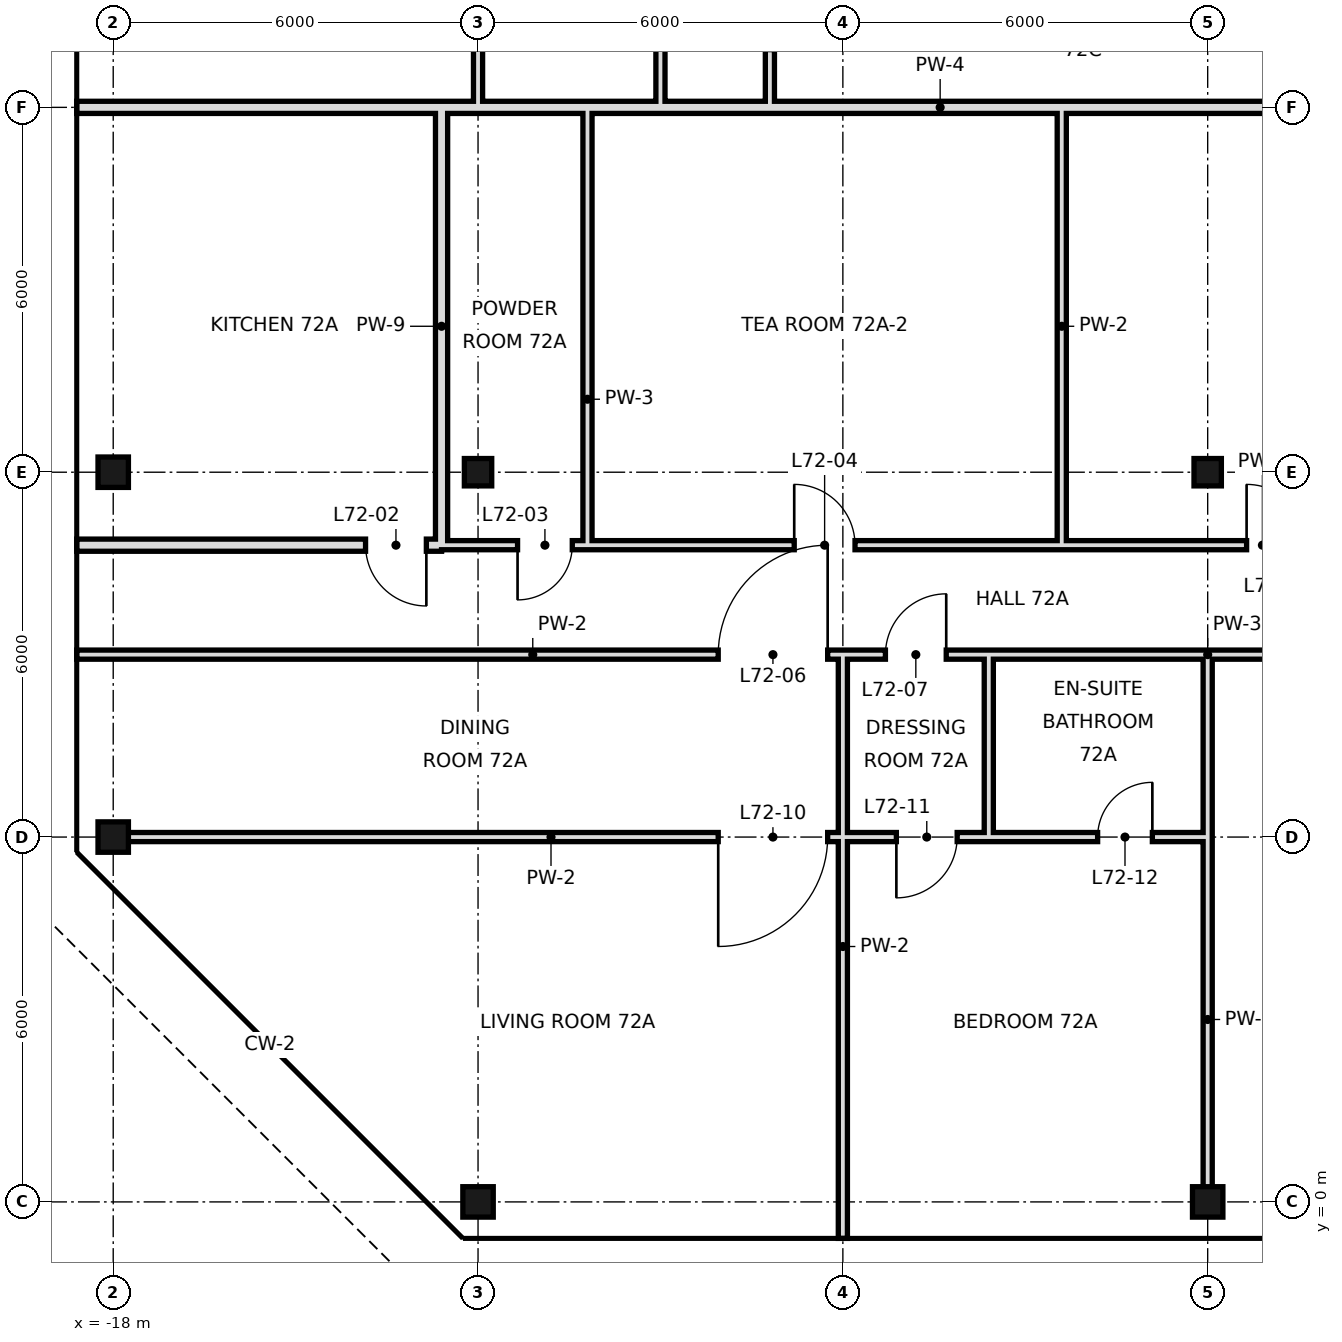
"""IFC4 building model, lengths in metres.
Left out: names, types, materials, properties, quantities, classifications, styles, units other than length and angle.
Written with IfcOpenShell. Run it as: python <this file> out.ifc"""

import sys

from ifc_helpers import new_model, si_unit, direction, frame, frame_2d, origin, origin_with_axes, origin_2d, place, context, subcontext, project, spatial, rectangle, hollow_rectangle, extrude, element, fill, save


model = new_model("IFC4")
c1 = context("Model", 3, precision=1e-05, world=origin(), true_north=direction((0.0, 1.0)))
c2 = subcontext(c1, "Body", "Model", "MODEL_VIEW")
j1 = project(units=[si_unit("LENGTHUNIT", "METRE"), si_unit("PLANEANGLEUNIT", "RADIAN")], contexts=[c1])
p1 = place(None, origin())
s1 = spatial("IfcSite", under=j1, at=p1, CompositionType="ELEMENT")
p2 = place(p1, origin())
s2 = spatial("IfcBuilding", under=s1, at=p2, CompositionType="ELEMENT")
p3 = place(p2, frame((0.0, 0.0, 305.2)))
s3 = spatial("IfcBuildingStorey", under=s2, at=p3, CompositionType="ELEMENT", Elevation=305.2)
for number, where, z_axis, x_axis in (
    (1, (-18.0, 6.0, 0.0), (0.0, 0.0, 1.0), (1.0, 0.0, 0.0)),
    (2, (-18.0, 12.0, 0.0), (0.0, 0.0, 1.0), (1.0, 0.0, 0.0)),
    (3, (-12.0, 0.0, 0.0), (0.0, 0.0, 1.0), (1.0, 0.0, 0.0)),
):
    element("IfcColumn", number, at=place(p3, frame(where, z_axis=z_axis, x_axis=x_axis)), inside=s3, PredefinedType="COLUMN", context=c2, shape_type="SweptSolid", body=[
        extrude(hollow_rectangle(XDim=0.5, YDim=0.5, WallThickness=0.025, at=origin_2d()), origin(), (0.0, 0.0, 1.0), 3.6),
    ])
p4 = place(p3, frame((-12.0, 12.0, 0.0), z_axis=(0.0, 0.0, 1.0), x_axis=(1.0, 0.0, 0.0)))
e4 = element("IfcColumn", 4, at=p4, inside=s3, PredefinedType="COLUMN", context=c2, shape_type="SweptSolid", body=[
    extrude(hollow_rectangle(XDim=0.45, YDim=0.45, WallThickness=0.022, at=origin_2d()), origin(), (0.0, 0.0, 1.0), 3.6),
])
p5 = place(p3, origin_with_axes())
e5 = element("IfcColumn", 5, at=p5, inside=s3, PredefinedType="COLUMN", context=c2, shape_type="SweptSolid", body=[
    extrude(hollow_rectangle(XDim=0.5, YDim=0.5, WallThickness=0.025, at=origin_2d()), origin(), (0.0, 0.0, 1.0), 3.6),
])
p6 = place(p3, frame((0.0, 12.0, 0.0), z_axis=(0.0, 0.0, 1.0), x_axis=(1.0, 0.0, 0.0)))
e6 = element("IfcColumn", 6, at=p6, inside=s3, PredefinedType="COLUMN", context=c2, shape_type="SweptSolid", body=[
    extrude(hollow_rectangle(XDim=0.45, YDim=0.45, WallThickness=0.022, at=origin_2d()), origin(), (0.0, 0.0, 1.0), 3.6),
])
p7 = place(p3, frame((-10.2, 10.8, 0.0), z_axis=(0.0, 0.0, 1.0), x_axis=(0.0, 1.0, 0.0)))
e7 = element("IfcWall", 7, at=p7, inside=s3, PredefinedType="PARTITIONING", context=c2, shape_type="SweptSolid", body=[
    extrude(rectangle(XDim=7.2, YDim=0.15, at=frame_2d((3.6, 0.0))), origin(), (0.0, 0.0, 1.0), 3.42),
])
p8 = place(p3, frame((-12.0, 18.0, 0.0), z_axis=(0.0, 0.0, 1.0), x_axis=(0.0, 1.0, 0.0)))
e8 = element("IfcWall", 8, at=p8, inside=s3, PredefinedType="PARTITIONING", context=c2, shape_type="SweptSolid", body=[
    extrude(rectangle(XDim=12.0, YDim=0.15, at=frame_2d((6.0, 0.0))), origin(), (0.0, 0.0, 1.0), 2.72),
])
p9 = place(p8, frame((3.16, 0.0, 0.0)))
e9 = element("IfcOpeningElement", 9, at=p9, cuts=e8, PredefinedType="OPENING", context=c2, shape_type="SweptSolid", body=[
    extrude(rectangle(XDim=1.8, YDim=2.4, at=frame_2d((0.9, 1.2))), frame((0.0, 0.085, 0.0), z_axis=(0.0, -1.0, 0.0), x_axis=(1.0, 0.0, 0.0)), (0.0, 0.0, 1.0), 0.17),
])
p10 = place(p3, frame((-12.6, 10.8, 0.0), z_axis=(0.0, 0.0, 1.0), x_axis=(0.0, 1.0, 0.0)))
e10 = element("IfcWall", 10, at=p10, inside=s3, PredefinedType="SOLIDWALL", context=c2, shape_type="SweptSolid", body=[
    extrude(rectangle(XDim=7.2, YDim=0.2, at=frame_2d((3.6, 0.0))), origin(), (0.0, 0.0, 1.0), 2.97),
])
p11 = place(p3, frame((-2.4, 10.8, 0.0), z_axis=(0.0, 0.0, 1.0), x_axis=(0.0, 1.0, 0.0)))
e11 = element("IfcWall", 11, at=p11, inside=s3, PredefinedType="PARTITIONING", context=c2, shape_type="SweptSolid", body=[
    extrude(rectangle(XDim=7.2, YDim=0.15, at=frame_2d((3.6, 0.0))), origin(), (0.0, 0.0, 1.0), 3.42),
])
p12 = place(p3, frame((-3.6, 6.0, 0.0), z_axis=(0.0, 0.0, 1.0), x_axis=(0.0, 1.0, 0.0)))
e12 = element("IfcWall", 12, at=p12, inside=s3, PredefinedType="PARTITIONING", context=c2, shape_type="SweptSolid", body=[
    extrude(rectangle(XDim=3.0, YDim=0.15, at=frame_2d((1.5, 0.0))), origin(), (0.0, 0.0, 1.0), 3.42),
])
p13 = place(p3, frame((-6.0, -0.6, 0.0), z_axis=(0.0, 0.0, 1.0), x_axis=(0.0, 1.0, 0.0)))
e13 = element("IfcWall", 13, at=p13, inside=s3, PredefinedType="PARTITIONING", context=c2, shape_type="SweptSolid", body=[
    extrude(rectangle(XDim=9.6, YDim=0.15, at=frame_2d((4.8, 0.0))), origin(), (0.0, 0.0, 1.0), 3.42),
])
p14 = place(p3, frame((-7.2, 18.0, 0.0), z_axis=(0.0, 0.0, 1.0), x_axis=(0.0, 1.0, 0.0)))
e14 = element("IfcWall", 14, at=p14, inside=s3, PredefinedType="PARTITIONING", context=c2, shape_type="SweptSolid", body=[
    extrude(rectangle(XDim=2.4, YDim=0.15, at=frame_2d((1.2, 0.0))), origin(), (0.0, 0.0, 1.0), 3.42),
])
p15 = place(p14, frame((0.95, 0.0, 0.0)))
e15 = element("IfcOpeningElement", 15, at=p15, cuts=e14, PredefinedType="OPENING", context=c2, shape_type="SweptSolid", body=[
    extrude(rectangle(XDim=0.9, YDim=2.4, at=frame_2d((0.45, 1.2))), frame((0.0, 0.085, 0.0), z_axis=(0.0, -1.0, 0.0), x_axis=(1.0, 0.0, 0.0)), (0.0, 0.0, 1.0), 0.17),
])
p16 = place(p3, frame((-9.0, 18.0, 0.0), z_axis=(0.0, 0.0, 1.0), x_axis=(0.0, 1.0, 0.0)))
e16 = element("IfcWall", 16, at=p16, inside=s3, PredefinedType="PARTITIONING", context=c2, shape_type="SweptSolid", body=[
    extrude(rectangle(XDim=18.0, YDim=0.15, at=frame_2d((9.0, 0.0))), origin(), (0.0, 0.0, 1.0), 3.42),
])
p17 = place(p16, frame((3.16, 0.0, 0.0)))
e17 = element("IfcOpeningElement", 17, at=p17, cuts=e16, PredefinedType="OPENING", context=c2, shape_type="SweptSolid", body=[
    extrude(rectangle(XDim=1.8, YDim=2.4, at=frame_2d((0.9, 1.2))), frame((0.0, 0.085, 0.0), z_axis=(0.0, -1.0, 0.0), x_axis=(1.0, 0.0, 0.0)), (0.0, 0.0, 1.0), 0.17),
])
p18 = place(p16, frame((13.6, 0.0, 0.0)))
e18 = element("IfcOpeningElement", 18, at=p18, cuts=e16, PredefinedType="OPENING", context=c2, shape_type="SweptSolid", body=[
    extrude(rectangle(XDim=1.0, YDim=2.4, at=frame_2d((0.5, 1.2))), frame((0.0, 0.085, 0.0), z_axis=(0.0, -1.0, 0.0), x_axis=(1.0, 0.0, 0.0)), (0.0, 0.0, 1.0), 0.17),
])
p19 = place(p3, frame((0.0, 0.0, 0.0), z_axis=(0.0, 0.0, 1.0), x_axis=(0.0, 1.0, 0.0)))
e19 = element("IfcWall", 19, at=p19, inside=s3, PredefinedType="PARTITIONING", context=c2, shape_type="SweptSolid", body=[
    extrude(rectangle(XDim=6.0, YDim=0.15, at=frame_2d((3.0, 0.0))), origin(), (0.0, 0.0, 1.0), 2.72),
])
p20 = place(p3, frame((0.0, 6.0, 0.0), z_axis=(0.0, 0.0, 1.0), x_axis=(0.0, 1.0, 0.0)))
e20 = element("IfcWall", 20, at=p20, inside=s3, PredefinedType="PARTITIONING", context=c2, shape_type="SweptSolid", body=[
    extrude(rectangle(XDim=3.0, YDim=0.15, at=frame_2d((1.5, 0.0))), origin(), (0.0, 0.0, 1.0), 2.72),
])
p21 = place(p3, frame((-18.6, 10.8, 0.0), z_axis=(0.0, 0.0, 1.0), x_axis=(1.0, 0.0, 0.0)))
e21 = element("IfcWall", 21, at=p21, inside=s3, PredefinedType="SOLIDWALL", context=c2, shape_type="SweptSolid", body=[
    extrude(rectangle(XDim=6.0, YDim=0.2, at=frame_2d((3.0, 0.0))), origin(), (0.0, 0.0, 1.0), 2.97),
])
p22 = place(p21, frame((4.75, 0.0, 0.0)))
e22 = element("IfcOpeningElement", 22, at=p22, cuts=e21, PredefinedType="OPENING", context=c2, shape_type="SweptSolid", body=[
    extrude(rectangle(XDim=1.0, YDim=2.4, at=frame_2d((0.5, 1.2))), frame((0.0, 0.11, 0.0), z_axis=(0.0, -1.0, 0.0), x_axis=(1.0, 0.0, 0.0)), (0.0, 0.0, 1.0), 0.22),
])
p23 = place(p3, frame((-10.2, 10.8, 0.0), z_axis=(0.0, 0.0, 1.0), x_axis=(1.0, 0.0, 0.0)))
e23 = element("IfcWall", 23, at=p23, inside=s3, PredefinedType="PARTITIONING", context=c2, shape_type="SweptSolid", body=[
    extrude(rectangle(XDim=22.2, YDim=0.15, at=frame_2d((11.1, 0.0))), origin(), (0.0, 0.0, 1.0), 3.42),
])
p24 = place(p23, frame((20.32, 0.0, 0.0)))
e24 = element("IfcOpeningElement", 24, at=p24, cuts=e23, PredefinedType="OPENING", context=c2, shape_type="SweptSolid", body=[
    extrude(rectangle(XDim=1.0, YDim=2.4, at=frame_2d((0.5, 1.2))), frame((0.0, 0.085, 0.0), z_axis=(0.0, -1.0, 0.0), x_axis=(1.0, 0.0, 0.0)), (0.0, 0.0, 1.0), 0.17),
])
p25 = place(p23, frame((3.4, 0.0, 0.0)))
e25 = element("IfcOpeningElement", 25, at=p25, cuts=e23, PredefinedType="OPENING", context=c2, shape_type="SweptSolid", body=[
    extrude(rectangle(XDim=1.0, YDim=2.4, at=frame_2d((0.5, 1.2))), frame((0.0, 0.085, 0.0), z_axis=(0.0, -1.0, 0.0), x_axis=(1.0, 0.0, 0.0)), (0.0, 0.0, 1.0), 0.17),
])
p26 = place(p23, frame((10.84, 0.0, 0.0)))
e26 = element("IfcOpeningElement", 26, at=p26, cuts=e23, PredefinedType="OPENING", context=c2, shape_type="SweptSolid", body=[
    extrude(rectangle(XDim=1.0, YDim=2.4, at=frame_2d((0.5, 1.2))), frame((0.0, 0.085, 0.0), z_axis=(0.0, -1.0, 0.0), x_axis=(1.0, 0.0, 0.0)), (0.0, 0.0, 1.0), 0.17),
])
p27 = place(p3, frame((-12.6, 10.8, 0.0), z_axis=(0.0, 0.0, 1.0), x_axis=(1.0, 0.0, 0.0)))
e27 = element("IfcWall", 27, at=p27, inside=s3, PredefinedType="PARTITIONING", context=c2, shape_type="SweptSolid", body=[
    extrude(rectangle(XDim=2.4, YDim=0.15, at=frame_2d((1.2, 0.0))), origin(), (0.0, 0.0, 1.0), 3.42),
])
p28 = place(p27, frame((1.25, 0.0, 0.0)))
e28 = element("IfcOpeningElement", 28, at=p28, cuts=e27, PredefinedType="OPENING", context=c2, shape_type="SweptSolid", body=[
    extrude(rectangle(XDim=0.9, YDim=2.4, at=frame_2d((0.45, 1.2))), frame((0.0, 0.085, 0.0), z_axis=(0.0, -1.0, 0.0), x_axis=(1.0, 0.0, 0.0)), (0.0, 0.0, 1.0), 0.17),
])
p29 = place(p3, frame((-18.6, 18.0, 0.0), z_axis=(0.0, 0.0, 1.0), x_axis=(1.0, 0.0, 0.0)))
e29 = element("IfcWall", 29, at=p29, inside=s3, PredefinedType="SOLIDWALL", context=c2, shape_type="SweptSolid", body=[
    extrude(rectangle(XDim=6.0, YDim=0.2, at=frame_2d((3.0, 0.0))), origin(), (0.0, 0.0, 1.0), 2.72),
])
p30 = place(p3, frame((-12.6, 18.0, 0.0), z_axis=(0.0, 0.0, 1.0), x_axis=(1.0, 0.0, 0.0)))
e30 = element("IfcWall", 30, at=p30, inside=s3, PredefinedType="SOLIDWALL", context=c2, shape_type="SweptSolid", body=[
    extrude(rectangle(XDim=15.7, YDim=0.2, at=frame_2d((7.85, 0.0))), origin(), (0.0, 0.0, 1.0), 2.72),
])
p31 = place(p3, frame((-18.0, 6.0, 0.0), z_axis=(0.0, 0.0, 1.0), x_axis=(1.0, 0.0, 0.0)))
e31 = element("IfcWall", 31, at=p31, inside=s3, PredefinedType="PARTITIONING", context=c2, shape_type="SweptSolid", body=[
    extrude(rectangle(XDim=14.4, YDim=0.15, at=frame_2d((7.2, 0.0))), origin(), (0.0, 0.0, 1.0), 2.72),
])
p32 = place(p31, frame((9.95, 0.0, 0.0)))
e32 = element("IfcOpeningElement", 32, at=p32, cuts=e31, PredefinedType="OPENING", context=c2, shape_type="SweptSolid", body=[
    extrude(rectangle(XDim=1.8, YDim=2.4, at=frame_2d((0.9, 1.2))), frame((0.0, 0.085, 0.0), z_axis=(0.0, -1.0, 0.0), x_axis=(1.0, 0.0, 0.0)), (0.0, 0.0, 1.0), 0.17),
])
p33 = place(p31, frame((12.88, 0.0, 0.0)))
e33 = element("IfcOpeningElement", 33, at=p33, cuts=e31, PredefinedType="OPENING", context=c2, shape_type="SweptSolid", body=[
    extrude(rectangle(XDim=1.0, YDim=2.4, at=frame_2d((0.5, 1.2))), frame((0.0, 0.085, 0.0), z_axis=(0.0, -1.0, 0.0), x_axis=(1.0, 0.0, 0.0)), (0.0, 0.0, 1.0), 0.17),
])
p34 = place(p3, frame((-3.6, 6.0, 0.0), z_axis=(0.0, 0.0, 1.0), x_axis=(1.0, 0.0, 0.0)))
e34 = element("IfcWall", 34, at=p34, inside=s3, PredefinedType="PARTITIONING", context=c2, shape_type="SweptSolid", body=[
    extrude(rectangle(XDim=3.6, YDim=0.15, at=frame_2d((1.8, 0.0))), origin(), (0.0, 0.0, 1.0), 2.72),
])
p35 = place(p34, frame((1.79, 0.0, 0.0)))
e35 = element("IfcOpeningElement", 35, at=p35, cuts=e34, PredefinedType="OPENING", context=c2, shape_type="SweptSolid", body=[
    extrude(rectangle(XDim=0.9, YDim=2.4, at=frame_2d((0.45, 1.2))), frame((0.0, 0.085, 0.0), z_axis=(0.0, -1.0, 0.0), x_axis=(1.0, 0.0, 0.0)), (0.0, 0.0, 1.0), 0.17),
])
p36 = place(p3, frame((-18.6, 9.0, 0.0), z_axis=(0.0, 0.0, 1.0), x_axis=(1.0, 0.0, 0.0)))
e36 = element("IfcWall", 36, at=p36, inside=s3, PredefinedType="PARTITIONING", context=c2, shape_type="SweptSolid", body=[
    extrude(rectangle(XDim=15.0, YDim=0.15, at=frame_2d((7.5, 0.0))), origin(), (0.0, 0.0, 1.0), 3.42),
])
p37 = place(p36, frame((10.55, 0.0, 0.0)))
e37 = element("IfcOpeningElement", 37, at=p37, cuts=e36, PredefinedType="OPENING", context=c2, shape_type="SweptSolid", body=[
    extrude(rectangle(XDim=1.8, YDim=2.4, at=frame_2d((0.9, 1.2))), frame((0.0, 0.085, 0.0), z_axis=(0.0, -1.0, 0.0), x_axis=(1.0, 0.0, 0.0)), (0.0, 0.0, 1.0), 0.17),
])
p38 = place(p36, frame((13.3, 0.0, 0.0)))
e38 = element("IfcOpeningElement", 38, at=p38, cuts=e36, PredefinedType="OPENING", context=c2, shape_type="SweptSolid", body=[
    extrude(rectangle(XDim=1.0, YDim=2.4, at=frame_2d((0.5, 1.2))), frame((0.0, 0.085, 0.0), z_axis=(0.0, -1.0, 0.0), x_axis=(1.0, 0.0, 0.0)), (0.0, 0.0, 1.0), 0.17),
])
p39 = place(p3, frame((0.0, 9.0, 0.0), z_axis=(0.0, 0.0, 1.0), x_axis=(1.0, 0.0, 0.0)))
e39 = element("IfcWall", 39, at=p39, inside=s3, PredefinedType="PARTITIONING", context=c2, shape_type="SweptSolid", body=[
    extrude(rectangle(XDim=6.0, YDim=0.15, at=frame_2d((3.0, 0.0))), origin(), (0.0, 0.0, 1.0), 3.42),
])
p40 = place(p39, frame((2.5, 0.0, 0.0)))
e40 = element("IfcOpeningElement", 40, at=p40, cuts=e39, PredefinedType="OPENING", context=c2, shape_type="SweptSolid", body=[
    extrude(rectangle(XDim=1.0, YDim=2.4, at=frame_2d((0.5, 1.2))), frame((0.0, 0.085, 0.0), z_axis=(0.0, -1.0, 0.0), x_axis=(1.0, 0.0, 0.0)), (0.0, 0.0, 1.0), 0.17),
])
p41 = place(p3, frame((-3.6, 9.0, 0.0), z_axis=(0.0, 0.0, 1.0), x_axis=(1.0, 0.0, 0.0)))
e41 = element("IfcWall", 41, at=p41, inside=s3, PredefinedType="PARTITIONING", context=c2, shape_type="SweptSolid", body=[
    extrude(rectangle(XDim=3.6, YDim=0.15, at=frame_2d((1.8, 0.0))), origin(), (0.0, 0.0, 1.0), 3.42),
])
p42 = place(p22, origin())
e42 = element("IfcDoor", 42, at=p42, inside=s3, OperationType="SINGLE_SWING_RIGHT", PredefinedType="DOOR", context=c2, shape_type="SweptSolid", body=[
    extrude(rectangle(XDim=1.0, YDim=2.4, at=frame_2d((0.5, 1.2))), frame((0.0, 0.025, 0.0), z_axis=(0.0, -1.0, 0.0), x_axis=(1.0, 0.0, 0.0)), (0.0, 0.0, 1.0), 0.05),
])
fill(e22, e42)
p43 = place(p28, frame((0.9, 0.0, 0.0), z_axis=(0.0, 0.0, 1.0), x_axis=(-1.0, 0.0, 0.0)))
e43 = element("IfcDoor", 43, at=p43, inside=s3, OperationType="SINGLE_SWING_RIGHT", PredefinedType="DOOR", context=c2, shape_type="SweptSolid", body=[
    extrude(rectangle(XDim=0.9, YDim=2.4, at=frame_2d((0.45, 1.2))), frame((0.0, 0.025, 0.0), z_axis=(0.0, -1.0, 0.0), x_axis=(1.0, 0.0, 0.0)), (0.0, 0.0, 1.0), 0.05),
])
fill(e28, e43)
p44 = place(p25, origin())
e44 = element("IfcDoor", 44, at=p44, inside=s3, OperationType="SINGLE_SWING_LEFT", PredefinedType="DOOR", context=c2, shape_type="SweptSolid", body=[
    extrude(rectangle(XDim=1.0, YDim=2.4, at=frame_2d((0.5, 1.2))), frame((0.0, 0.025, 0.0), z_axis=(0.0, -1.0, 0.0), x_axis=(1.0, 0.0, 0.0)), (0.0, 0.0, 1.0), 0.05),
])
fill(e25, e44)
p45 = place(p26, origin())
e45 = element("IfcDoor", 45, at=p45, inside=s3, OperationType="SINGLE_SWING_LEFT", PredefinedType="DOOR", context=c2, shape_type="SweptSolid", body=[
    extrude(rectangle(XDim=1.0, YDim=2.4, at=frame_2d((0.5, 1.2))), frame((0.0, 0.025, 0.0), z_axis=(0.0, -1.0, 0.0), x_axis=(1.0, 0.0, 0.0)), (0.0, 0.0, 1.0), 0.05),
])
fill(e26, e45)
p46 = place(p37, frame((1.8, 0.0, 0.0), z_axis=(0.0, 0.0, 1.0), x_axis=(-1.0, 0.0, 0.0)))
e46 = element("IfcDoor", 46, at=p46, inside=s3, OperationType="SINGLE_SWING_LEFT", PredefinedType="DOOR", context=c2, shape_type="SweptSolid", body=[
    extrude(rectangle(XDim=1.8, YDim=2.4, at=frame_2d((0.9, 1.2))), frame((0.0, 0.025, 0.0), z_axis=(0.0, -1.0, 0.0), x_axis=(1.0, 0.0, 0.0)), (0.0, 0.0, 1.0), 0.05),
])
fill(e37, e46)
p47 = place(p38, frame((1.0, 0.0, 0.0), z_axis=(0.0, 0.0, 1.0), x_axis=(-1.0, 0.0, 0.0)))
e47 = element("IfcDoor", 47, at=p47, inside=s3, OperationType="SINGLE_SWING_LEFT", PredefinedType="DOOR", context=c2, shape_type="SweptSolid", body=[
    extrude(rectangle(XDim=1.0, YDim=2.4, at=frame_2d((0.5, 1.2))), frame((0.0, 0.025, 0.0), z_axis=(0.0, -1.0, 0.0), x_axis=(1.0, 0.0, 0.0)), (0.0, 0.0, 1.0), 0.05),
])
fill(e38, e47)
p48 = place(p32, frame((1.8, 0.0, 0.0), z_axis=(0.0, 0.0, 1.0), x_axis=(-1.0, 0.0, 0.0)))
e48 = element("IfcDoor", 48, at=p48, inside=s3, OperationType="SINGLE_SWING_RIGHT", PredefinedType="DOOR", context=c2, shape_type="SweptSolid", body=[
    extrude(rectangle(XDim=1.8, YDim=2.4, at=frame_2d((0.9, 1.2))), frame((0.0, 0.025, 0.0), z_axis=(0.0, -1.0, 0.0), x_axis=(1.0, 0.0, 0.0)), (0.0, 0.0, 1.0), 0.05),
])
fill(e32, e48)
p49 = place(p33, frame((1.0, 0.0, 0.0), z_axis=(0.0, 0.0, 1.0), x_axis=(-1.0, 0.0, 0.0)))
e49 = element("IfcDoor", 49, at=p49, inside=s3, OperationType="SINGLE_SWING_RIGHT", PredefinedType="DOOR", context=c2, shape_type="SweptSolid", body=[
    extrude(rectangle(XDim=1.0, YDim=2.4, at=frame_2d((0.5, 1.2))), frame((0.0, 0.025, 0.0), z_axis=(0.0, -1.0, 0.0), x_axis=(1.0, 0.0, 0.0)), (0.0, 0.0, 1.0), 0.05),
])
fill(e33, e49)
p50 = place(p35, frame((0.9, 0.0, 0.0), z_axis=(0.0, 0.0, 1.0), x_axis=(-1.0, 0.0, 0.0)))
e50 = element("IfcDoor", 50, at=p50, inside=s3, OperationType="SINGLE_SWING_LEFT", PredefinedType="DOOR", context=c2, shape_type="SweptSolid", body=[
    extrude(rectangle(XDim=0.9, YDim=2.4, at=frame_2d((0.45, 1.2))), frame((0.0, 0.025, 0.0), z_axis=(0.0, -1.0, 0.0), x_axis=(1.0, 0.0, 0.0)), (0.0, 0.0, 1.0), 0.05),
])
fill(e35, e50)
save(model, sys.argv[1])
